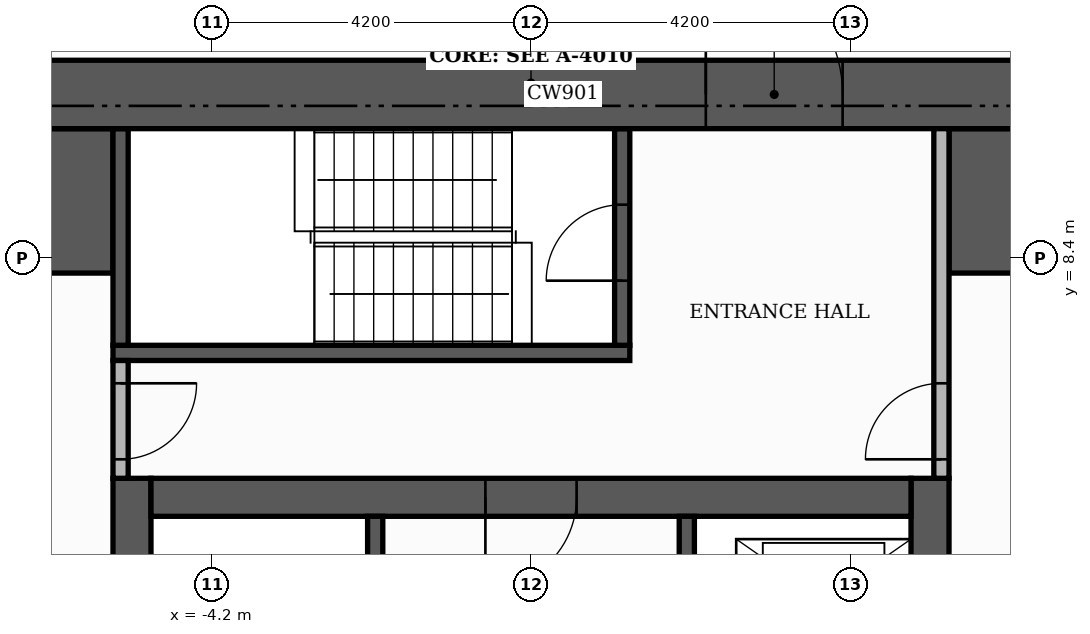
"""IFC4 building model, lengths in metres.
Left out: names, types, materials, properties, quantities, classifications, styles, units other than length and angle.
Written with IfcOpenShell. Run it as: python <this file> out.ifc"""

import sys

from ifc_helpers import new_model, si_unit, direction, frame, frame_2d, origin, place, context, subcontext, project, spatial, rectangle, extrude, element, fill, save


model = new_model("IFC4")
c1 = context("Model", 3, precision=1e-05, world=origin(), true_north=direction((0.0, 1.0)))
c2 = subcontext(c1, "Body", "Model", "MODEL_VIEW")
j1 = project(units=[si_unit("LENGTHUNIT", "METRE"), si_unit("PLANEANGLEUNIT", "RADIAN")], contexts=[c1])
p1 = place(None, origin())
s1 = spatial("IfcSite", under=j1, at=p1, CompositionType="ELEMENT")
p2 = place(p1, origin())
s2 = spatial("IfcBuilding", under=s1, at=p2, CompositionType="ELEMENT")
p3 = place(p2, frame((0.0, 0.0, 54.3)))
s3 = spatial("IfcBuildingStorey", under=s2, at=p3, CompositionType="ELEMENT", Elevation=54.3)
for number, where, z_axis, x_axis in (
    (1, (-5.25, -5.0, 0.0), (0.0, 0.0, 1.0), (0.0, 1.0, 0.0)),
    (2, (5.25, -5.0, 0.0), (0.0, 0.0, 1.0), (0.0, 1.0, 0.0)),
):
    element("IfcWall", number, at=place(p3, frame(where, z_axis=z_axis, x_axis=x_axis)), inside=s3, PredefinedType="SHEAR", context=c2, shape_type="SweptSolid", body=[
        extrude(rectangle(XDim=10.5, YDim=0.5, at=frame_2d((5.25, 0.0))), origin(), (0.0, 0.0, 1.0), 3.48),
    ])
p4 = place(p3, frame((-5.0, 5.25, 0.0), z_axis=(0.0, 0.0, 1.0), x_axis=(1.0, 0.0, 0.0)))
e3 = element("IfcWall", 3, at=p4, inside=s3, PredefinedType="SHEAR", context=c2, shape_type="SweptSolid", body=[
    extrude(rectangle(XDim=10.0, YDim=0.5, at=frame_2d((5.0, 0.0))), origin(), (0.0, 0.0, 1.0), 3.48),
])
p5 = place(p4, frame((4.4, 0.0, 0.0)))
e4 = element("IfcOpeningElement", 4, at=p5, cuts=e3, PredefinedType="OPENING", context=c2, shape_type="SweptSolid", body=[
    extrude(rectangle(XDim=1.2, YDim=2.1, at=frame_2d((0.6, 1.05))), frame((0.0, 0.26, 0.0), z_axis=(0.0, -1.0, 0.0), x_axis=(1.0, 0.0, 0.0)), (0.0, 0.0, 1.0), 0.52),
])
for number, where, z_axis, x_axis in (
    (5, (-10.1, 9.15, 0.0), (0.0, 0.0, 1.0), (1.0, 0.0, 0.0)),
    (6, (5.5, 9.15, 0.0), (0.0, 0.0, 1.0), (1.0, 0.0, 0.0)),
):
    element("IfcWall", number, at=place(p3, frame(where, z_axis=z_axis, x_axis=x_axis)), inside=s3, PredefinedType="SHEAR", context=c2, shape_type="SweptSolid", body=[
        extrude(rectangle(XDim=4.6, YDim=1.9, at=frame_2d((2.3, 0.0))), origin(), (0.0, 0.0, 1.0), 3.48),
    ])
p6 = place(p3, frame((-2.05, -1.4, 0.0), z_axis=(0.0, 0.0, 1.0), x_axis=(0.0, 1.0, 0.0)))
e7 = element("IfcWall", 7, at=p6, inside=s3, PredefinedType="SHEAR", context=c2, shape_type="SweptSolid", body=[
    extrude(rectangle(XDim=6.4, YDim=0.2, at=frame_2d((3.2, 0.0))), origin(), (0.0, 0.0, 1.0), 3.48),
])
p7 = place(p6, frame((0.15, 0.0, 0.0)))
e8 = element("IfcOpeningElement", 8, at=p7, cuts=e7, PredefinedType="OPENING", context=c2, shape_type="SweptSolid", body=[
    extrude(rectangle(XDim=1.0, YDim=2.1, at=frame_2d((0.5, 1.05))), frame((0.0, 0.11, 0.0), z_axis=(0.0, -1.0, 0.0), x_axis=(1.0, 0.0, 0.0)), (0.0, 0.0, 1.0), 0.22),
])
p8 = place(p3, frame((-5.5, 7.15, 0.0), z_axis=(0.0, 0.0, 1.0), x_axis=(1.0, 0.0, 0.0)))
e9 = element("IfcWall", 9, at=p8, inside=s3, PredefinedType="SHEAR", context=c2, shape_type="SweptSolid", body=[
    extrude(rectangle(XDim=6.8, YDim=0.2, at=frame_2d((3.4, 0.0))), origin(), (0.0, 0.0, 1.0), 3.48),
])
p9 = place(p3, frame((-5.4, 7.25, 0.0), z_axis=(0.0, 0.0, 1.0), x_axis=(0.0, 1.0, 0.0)))
e10 = element("IfcWall", 10, at=p9, inside=s3, PredefinedType="SHEAR", context=c2, shape_type="SweptSolid", body=[
    extrude(rectangle(XDim=2.85, YDim=0.2, at=frame_2d((1.425, 0.0))), origin(), (0.0, 0.0, 1.0), 3.48),
])
p10 = place(p3, frame((1.2, 7.25, 0.0), z_axis=(0.0, 0.0, 1.0), x_axis=(0.0, 1.0, 0.0)))
e11 = element("IfcWall", 11, at=p10, inside=s3, PredefinedType="SHEAR", context=c2, shape_type="SweptSolid", body=[
    extrude(rectangle(XDim=2.85, YDim=0.2, at=frame_2d((1.425, 0.0))), origin(), (0.0, 0.0, 1.0), 3.48),
])
p11 = place(p10, frame((0.85, 0.0, 0.0)))
e12 = element("IfcOpeningElement", 12, at=p11, cuts=e11, PredefinedType="OPENING", context=c2, shape_type="SweptSolid", body=[
    extrude(rectangle(XDim=1.0, YDim=2.1, at=frame_2d((0.5, 1.05))), frame((0.0, 0.11, 0.0), z_axis=(0.0, -1.0, 0.0), x_axis=(1.0, 0.0, 0.0)), (0.0, 0.0, 1.0), 0.22),
])
p12 = place(p3, frame((2.05, 1.6, 0.0), z_axis=(0.0, 0.0, 1.0), x_axis=(0.0, 1.0, 0.0)))
e13 = element("IfcWall", 13, at=p12, inside=s3, PredefinedType="SHEAR", context=c2, shape_type="SweptSolid", body=[
    extrude(rectangle(XDim=3.4, YDim=0.2, at=frame_2d((1.7, 0.0))), origin(), (0.0, 0.0, 1.0), 3.48),
])
p13 = place(p12, frame((1.75, 0.0, 0.0)))
e14 = element("IfcOpeningElement", 14, at=p13, cuts=e13, PredefinedType="OPENING", context=c2, shape_type="SweptSolid", body=[
    extrude(rectangle(XDim=1.1, YDim=2.1, at=frame_2d((0.55, 1.05))), frame((0.0, 0.11, 0.0), z_axis=(0.0, -1.0, 0.0), x_axis=(1.0, 0.0, 0.0)), (0.0, 0.0, 1.0), 0.22),
])
p14 = place(p12, frame((0.15, 0.0, 0.0)))
e15 = element("IfcOpeningElement", 15, at=p14, cuts=e13, PredefinedType="OPENING", context=c2, shape_type="SweptSolid", body=[
    extrude(rectangle(XDim=0.8, YDim=2.1, at=frame_2d((0.4, 1.05))), frame((0.0, 0.11, 0.0), z_axis=(0.0, -1.0, 0.0), x_axis=(1.0, 0.0, 0.0)), (0.0, 0.0, 1.0), 0.22),
])
p15 = place(p3, frame((-11.0, 10.55, 0.0), z_axis=(0.0, 0.0, 1.0), x_axis=(1.0, 0.0, 0.0)))
e16 = element("IfcWall", 16, at=p15, inside=s3, PredefinedType="SHEAR", context=c2, shape_type="SweptSolid", body=[
    extrude(rectangle(XDim=22.0, YDim=0.9, at=frame_2d((11.0, 0.0))), origin(), (0.0, 0.0, 1.0), 3.48),
])
p16 = place(p15, frame((13.3, 0.0, 0.0)))
e17 = element("IfcOpeningElement", 17, at=p16, cuts=e16, PredefinedType="OPENING", context=c2, shape_type="SweptSolid", body=[
    extrude(rectangle(XDim=1.8, YDim=2.2, at=frame_2d((0.9, 1.1))), frame((0.0, 0.46, 0.0), z_axis=(0.0, -1.0, 0.0), x_axis=(1.0, 0.0, 0.0)), (0.0, 0.0, 1.0), 0.92),
])
p17 = place(p3, frame((-5.4, 5.5, 0.0), z_axis=(0.0, 0.0, 1.0), x_axis=(0.0, 1.0, 0.0)))
e18 = element("IfcWall", 18, at=p17, inside=s3, PredefinedType="PARTITIONING", context=c2, shape_type="SweptSolid", body=[
    extrude(rectangle(XDim=1.55, YDim=0.2, at=frame_2d((0.775, 0.0))), origin(), (0.0, 0.0, 1.0), 3.48),
])
p18 = place(p17, frame((0.25, 0.0, 0.0)))
e19 = element("IfcOpeningElement", 19, at=p18, cuts=e18, PredefinedType="OPENING", context=c2, shape_type="SweptSolid", body=[
    extrude(rectangle(XDim=1.0, YDim=2.1, at=frame_2d((0.5, 1.05))), frame((0.0, 0.11, 0.0), z_axis=(0.0, -1.0, 0.0), x_axis=(1.0, 0.0, 0.0)), (0.0, 0.0, 1.0), 0.22),
])
p19 = place(p3, frame((5.4, 5.5, 0.0), z_axis=(0.0, 0.0, 1.0), x_axis=(0.0, 1.0, 0.0)))
e20 = element("IfcWall", 20, at=p19, inside=s3, PredefinedType="PARTITIONING", context=c2, shape_type="SweptSolid", body=[
    extrude(rectangle(XDim=4.6, YDim=0.2, at=frame_2d((2.3, 0.0))), origin(), (0.0, 0.0, 1.0), 3.48),
])
p20 = place(p19, frame((0.25, 0.0, 0.0)))
e21 = element("IfcOpeningElement", 21, at=p20, cuts=e20, PredefinedType="OPENING", context=c2, shape_type="SweptSolid", body=[
    extrude(rectangle(XDim=1.0, YDim=2.1, at=frame_2d((0.5, 1.05))), frame((0.0, 0.11, 0.0), z_axis=(0.0, -1.0, 0.0), x_axis=(1.0, 0.0, 0.0)), (0.0, 0.0, 1.0), 0.22),
])
p21 = place(p5, frame((1.2, 0.0, 0.0), z_axis=(0.0, 0.0, 1.0), x_axis=(-1.0, 0.0, 0.0)))
e22 = element("IfcDoor", 22, at=p21, inside=s3, OperationType="SINGLE_SWING_LEFT", PredefinedType="DOOR", context=c2, shape_type="SweptSolid", body=[
    extrude(rectangle(XDim=1.2, YDim=2.1, at=frame_2d((0.6, 1.05))), frame((0.0, 0.025, 0.0), z_axis=(0.0, -1.0, 0.0), x_axis=(1.0, 0.0, 0.0)), (0.0, 0.0, 1.0), 0.05),
])
fill(e4, e22)
p22 = place(p11, origin())
e23 = element("IfcDoor", 23, at=p22, inside=s3, OperationType="SINGLE_SWING_LEFT", PredefinedType="DOOR", context=c2, shape_type="SweptSolid", body=[
    extrude(rectangle(XDim=1.0, YDim=2.1, at=frame_2d((0.5, 1.05))), frame((0.0, 0.025, 0.0), z_axis=(0.0, -1.0, 0.0), x_axis=(1.0, 0.0, 0.0)), (0.0, 0.0, 1.0), 0.05),
])
fill(e12, e23)
p23 = place(p18, frame((1.0, 0.0, 0.0), z_axis=(0.0, 0.0, 1.0), x_axis=(-1.0, 0.0, 0.0)))
e24 = element("IfcDoor", 24, at=p23, inside=s3, OperationType="SINGLE_SWING_RIGHT", PredefinedType="DOOR", context=c2, shape_type="SweptSolid", body=[
    extrude(rectangle(XDim=1.0, YDim=2.1, at=frame_2d((0.5, 1.05))), frame((0.0, 0.025, 0.0), z_axis=(0.0, -1.0, 0.0), x_axis=(1.0, 0.0, 0.0)), (0.0, 0.0, 1.0), 0.05),
])
fill(e19, e24)
p24 = place(p20, origin())
e25 = element("IfcDoor", 25, at=p24, inside=s3, OperationType="SINGLE_SWING_LEFT", PredefinedType="DOOR", context=c2, shape_type="SweptSolid", body=[
    extrude(rectangle(XDim=1.0, YDim=2.1, at=frame_2d((0.5, 1.05))), frame((0.0, 0.025, 0.0), z_axis=(0.0, -1.0, 0.0), x_axis=(1.0, 0.0, 0.0)), (0.0, 0.0, 1.0), 0.05),
])
fill(e21, e25)
p25 = place(p16, origin())
e26 = element("IfcDoor", 26, at=p25, inside=s3, OperationType="DOUBLE_DOOR_SINGLE_SWING", PredefinedType="DOOR", context=c2, shape_type="SweptSolid", body=[
    extrude(rectangle(XDim=1.8, YDim=2.2, at=frame_2d((0.9, 1.1))), frame((0.0, 0.025, 0.0), z_axis=(0.0, -1.0, 0.0), x_axis=(1.0, 0.0, 0.0)), (0.0, 0.0, 1.0), 0.05),
])
fill(e17, e26)
save(model, sys.argv[1])
